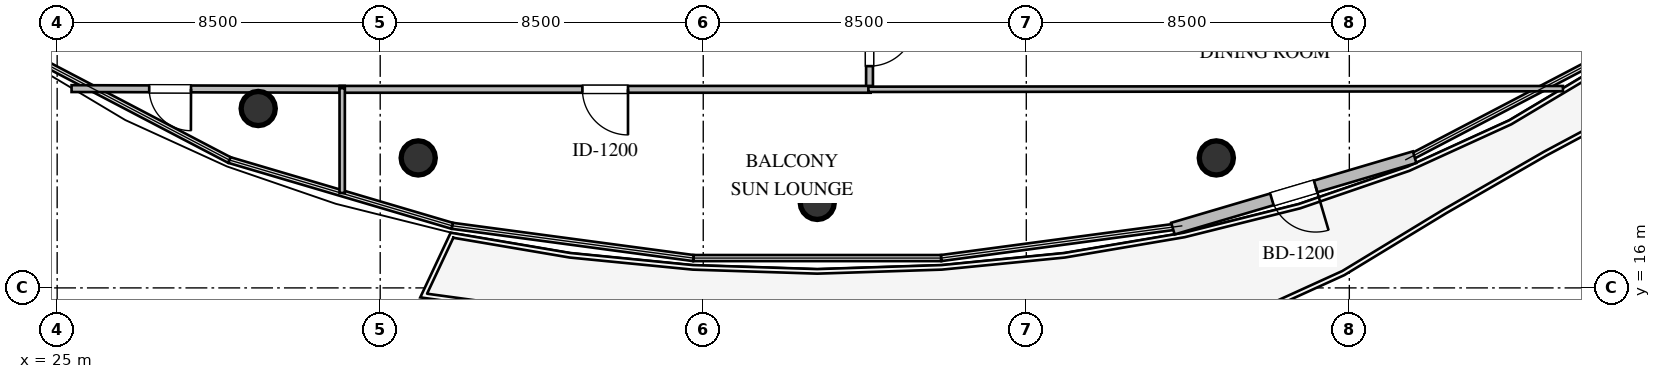
"""IFC4 building model, lengths in metres.
Left out: names, types, materials, properties, quantities, classifications, styles, units other than length and angle.
Written with IfcOpenShell. Run it as: python <this file> out.ifc"""

import sys

from ifc_helpers import new_model, si_unit, direction, frame, frame_2d, origin, origin_2d, place, context, subcontext, project, spatial, rectangle, circle, extrude, element, fill, save


model = new_model("IFC4")
c1 = context("Model", 3, precision=1e-05, world=origin(), true_north=direction((0.0, 1.0)))
c2 = subcontext(c1, "Body", "Model", "MODEL_VIEW")
j1 = project(units=[si_unit("LENGTHUNIT", "METRE"), si_unit("PLANEANGLEUNIT", "RADIAN")], contexts=[c1])
p1 = place(None, origin())
s1 = spatial("IfcSite", under=j1, at=p1, CompositionType="ELEMENT")
p2 = place(p1, origin())
s2 = spatial("IfcBuilding", under=s1, at=p2, CompositionType="ELEMENT")
p3 = place(p2, frame((0.0, 0.0, 258.6)))
s3 = spatial("IfcBuildingStorey", under=s2, at=p3, CompositionType="ELEMENT", Elevation=258.6)
for number, where, z_axis, x_axis in (
    (1, (30.29, 20.72, -0.24), (0.0, 0.0, 1.0), (1.0, 0.0, 0.0)),
    (2, (34.5, 19.42, -0.24), (0.0, 0.0, 1.0), (1.0, 0.0, 0.0)),
    (3, (45.0, 18.25, -0.24), (0.0, 0.0, 1.0), (1.0, 0.0, 0.0)),
    (4, (55.5, 19.42, -0.24), (0.0, 0.0, 1.0), (1.0, 0.0, 0.0)),
):
    element("IfcColumn", number, at=place(p3, frame(where, z_axis=z_axis, x_axis=x_axis)), inside=s3, PredefinedType="COLUMN", context=c2, shape_type="SweptSolid", body=[
        extrude(circle(Radius=0.45, at=origin_2d()), origin(), (0.0, 0.0, 1.0), 4.04),
    ])
p4 = place(p3, frame((60.718, 19.439, 0.0), z_axis=(0.0, 0.0, 1.0), x_axis=(-0.959026574291, -0.283316130503, 0.0)))
e5 = element("IfcWall", 5, at=p4, inside=s3, PredefinedType="STANDARD", context=c2, shape_type="SweptSolid", body=[
    extrude(rectangle(XDim=6.632, YDim=0.32, at=frame_2d((3.316, 0.0))), origin(), (0.0, 0.0, 1.0), 3.56),
])
p5 = place(p4, frame((2.716, 0.0, 0.0)))
e6 = element("IfcOpeningElement", 6, at=p5, cuts=e5, PredefinedType="OPENING", context=c2, shape_type="SweptSolid", body=[
    extrude(rectangle(XDim=1.2, YDim=2.15, at=frame_2d((0.6, 1.075))), frame((0.0, 0.17, 0.0), z_axis=(0.0, -1.0, 0.0), x_axis=(1.0, 0.0, 0.0)), (0.0, 0.0, 1.0), 0.34),
])
p6 = place(p3, frame((46.375, 23.675, 0.0), z_axis=(0.0, 0.0, 1.0), x_axis=(0.0, -1.0, 0.0)))
e7 = element("IfcWall", 7, at=p6, inside=s3, PredefinedType="PARTITIONING", context=c2, shape_type="SweptSolid", body=[
    extrude(rectangle(XDim=2.48, YDim=0.18, at=frame_2d((1.24, 0.0))), origin(), (0.0, 0.0, 1.0), 3.56),
])
p7 = place(p6, frame((0.64, 0.0, 0.0)))
e8 = element("IfcOpeningElement", 8, at=p7, cuts=e7, PredefinedType="OPENING", context=c2, shape_type="SweptSolid", body=[
    extrude(rectangle(XDim=1.2, YDim=2.15, at=frame_2d((0.6, 1.075))), frame((0.0, 0.1, 0.0), z_axis=(0.0, -1.0, 0.0), x_axis=(1.0, 0.0, 0.0)), (0.0, 0.0, 1.0), 0.2),
])
p8 = place(p3, frame((32.565, 21.225, 0.0), z_axis=(0.0, 0.0, 1.0), x_axis=(-0.999996578231, 0.002616013336, 0.0)))
e9 = element("IfcWall", 9, at=p8, inside=s3, PredefinedType="PARTITIONING", context=c2, shape_type="SweptSolid", body=[
    extrude(rectangle(XDim=7.186, YDim=0.18, at=frame_2d((3.593, 0.0))), origin(), (0.0, 0.0, 1.0), 3.017),
])
p9 = place(p8, frame((4.043, 0.0, 0.0)))
e10 = element("IfcOpeningElement", 10, at=p9, cuts=e9, PredefinedType="OPENING", context=c2, shape_type="SweptSolid", body=[
    extrude(rectangle(XDim=1.1, YDim=2.1, at=frame_2d((0.55, 1.05))), frame((0.0, 0.1, 0.0), z_axis=(0.0, -1.0, 0.0), x_axis=(1.0, 0.0, 0.0)), (0.0, 0.0, 1.0), 0.2),
])
p10 = place(p3, frame((46.405, 21.225, 0.0), z_axis=(0.0, 0.0, 1.0), x_axis=(-1.0, 0.0, 0.0)))
e11 = element("IfcWall", 11, at=p10, inside=s3, PredefinedType="PARTITIONING", context=c2, shape_type="SweptSolid", body=[
    extrude(rectangle(XDim=13.97, YDim=0.18, at=frame_2d((6.985, 0.0))), origin(), (0.0, 0.0, 1.0), 3.196),
])
p11 = place(p10, frame((6.385, 0.0, 0.0)))
e12 = element("IfcOpeningElement", 12, at=p11, cuts=e11, PredefinedType="OPENING", context=c2, shape_type="SweptSolid", body=[
    extrude(rectangle(XDim=1.2, YDim=2.15, at=frame_2d((0.6, 1.075))), frame((0.0, 0.1, 0.0), z_axis=(0.0, -1.0, 0.0), x_axis=(1.0, 0.0, 0.0)), (0.0, 0.0, 1.0), 0.2),
])
p12 = place(p3, frame((64.621, 21.243, 0.0), z_axis=(0.0, 0.0, 1.0), x_axis=(-0.999999524525, -0.000975166183, 0.0)))
e13 = element("IfcWall", 13, at=p12, inside=s3, PredefinedType="PARTITIONING", context=c2, shape_type="SweptSolid", body=[
    extrude(rectangle(XDim=18.276, YDim=0.14, at=frame_2d((9.138, 0.0))), origin(), (0.0, 0.0, 1.0), 3.196),
])
p13 = place(p3, frame((32.5, 21.255, 0.0), z_axis=(0.0, 0.0, 1.0), x_axis=(0.0, -1.0, 0.0)))
e14 = element("IfcWall", 14, at=p13, inside=s3, PredefinedType="PARTITIONING", context=c2, shape_type="SweptSolid", body=[
    extrude(rectangle(XDim=2.757, YDim=0.14, at=frame_2d((1.378, 0.0))), origin(), (0.0, 0.0, 1.0), 3.56),
])
p14 = place(p5, origin())
e15 = element("IfcDoor", 15, at=p14, inside=s3, OperationType="SINGLE_SWING_LEFT", PredefinedType="DOOR", context=c2, shape_type="SweptSolid", body=[
    extrude(rectangle(XDim=1.2, YDim=2.15, at=frame_2d((0.6, 1.075))), frame((0.0, 0.025, 0.0), z_axis=(0.0, -1.0, 0.0), x_axis=(1.0, 0.0, 0.0)), (0.0, 0.0, 1.0), 0.05),
])
fill(e6, e15)
p15 = place(p7, origin())
e16 = element("IfcDoor", 16, at=p15, inside=s3, OperationType="SINGLE_SWING_LEFT", PredefinedType="DOOR", context=c2, shape_type="SweptSolid", body=[
    extrude(rectangle(XDim=1.2, YDim=2.15, at=frame_2d((0.6, 1.075))), frame((0.0, 0.025, 0.0), z_axis=(0.0, -1.0, 0.0), x_axis=(1.0, 0.0, 0.0)), (0.0, 0.0, 1.0), 0.05),
])
fill(e8, e16)
p16 = place(p9, origin())
e17 = element("IfcDoor", 17, at=p16, inside=s3, OperationType="SINGLE_SWING_LEFT", PredefinedType="DOOR", context=c2, shape_type="SweptSolid", body=[
    extrude(rectangle(XDim=1.1, YDim=2.1, at=frame_2d((0.55, 1.05))), frame((0.0, 0.025, 0.0), z_axis=(0.0, -1.0, 0.0), x_axis=(1.0, 0.0, 0.0)), (0.0, 0.0, 1.0), 0.05),
])
fill(e10, e17)
p17 = place(p11, origin())
e18 = element("IfcDoor", 18, at=p17, inside=s3, OperationType="SINGLE_SWING_LEFT", PredefinedType="DOOR", context=c2, shape_type="SweptSolid", body=[
    extrude(rectangle(XDim=1.2, YDim=2.15, at=frame_2d((0.6, 1.075))), frame((0.0, 0.025, 0.0), z_axis=(0.0, -1.0, 0.0), x_axis=(1.0, 0.0, 0.0)), (0.0, 0.0, 1.0), 0.05),
])
fill(e12, e18)
save(model, sys.argv[1])
